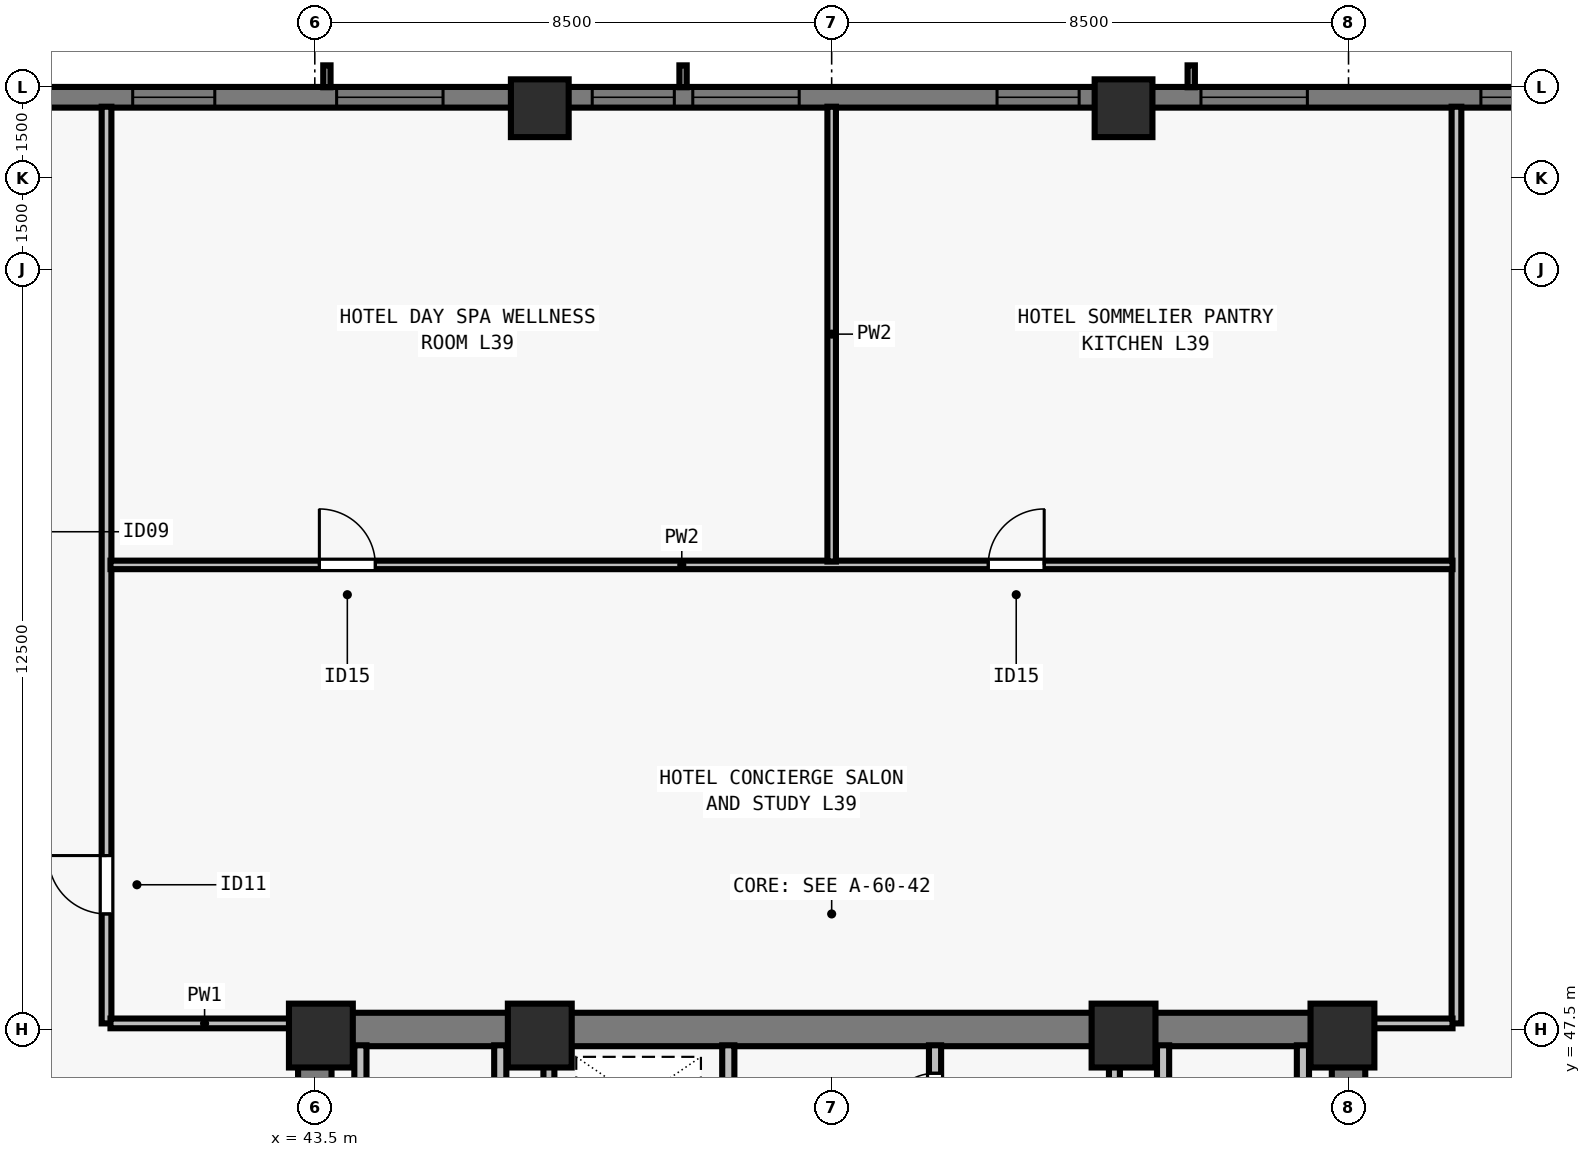
"""IFC4 building model, lengths in metres.
Left out: names, types, materials, properties, quantities, classifications, styles, units other than length and angle.
Written with IfcOpenShell. Run it as: python <this file> out.ifc"""

import sys

from ifc_helpers import new_model, si_unit, direction, frame, frame_2d, origin, origin_2d, place, context, subcontext, project, spatial, rectangle, extrude, element, fill, save


model = new_model("IFC4")
c1 = context("Model", 3, precision=1e-05, world=origin(), true_north=direction((0.0, 1.0)))
c2 = subcontext(c1, "Body", "Model", "MODEL_VIEW")
j1 = project(units=[si_unit("LENGTHUNIT", "METRE"), si_unit("PLANEANGLEUNIT", "RADIAN")], contexts=[c1])
p1 = place(None, origin())
s1 = spatial("IfcSite", under=j1, at=p1, CompositionType="ELEMENT")
p2 = place(p1, origin())
s2 = spatial("IfcBuilding", under=s1, at=p2, CompositionType="ELEMENT")
p3 = place(p2, frame((0.0, 0.0, 144.5)))
s3 = spatial("IfcBuildingStorey", under=s2, at=p3, CompositionType="ELEMENT", Elevation=144.5)
for number, where, z_axis, x_axis in (
    (1, (43.6, 47.4, 0.0), (0.0, 0.0, 1.0), (1.0, 0.0, 0.0)),
    (2, (47.2, 47.4, 0.0), (0.0, 0.0, 1.0), (1.0, 0.0, 0.0)),
    (3, (56.8, 47.4, 0.0), (0.0, 0.0, 1.0), (1.0, 0.0, 0.0)),
    (4, (60.4, 47.4, 0.0), (0.0, 0.0, 1.0), (1.0, 0.0, 0.0)),
):
    element("IfcColumn", number, at=place(p3, frame(where, z_axis=z_axis, x_axis=x_axis)), inside=s3, PredefinedType="COLUMN", context=c2, shape_type="SweptSolid", body=[
        extrude(rectangle(XDim=1.05, YDim=1.05, at=origin_2d()), origin(), (0.0, 0.0, 1.0), 3.5),
    ])
for number, where, z_axis, x_axis in (
    (5, (56.8, 62.65, 0.0), (0.0, 0.0, 1.0), (1.0, 0.0, 0.0)),
    (6, (47.2, 62.65, 0.0), (0.0, 0.0, 1.0), (1.0, 0.0, 0.0)),
):
    element("IfcColumn", number, at=place(p3, frame(where, z_axis=z_axis, x_axis=x_axis)), inside=s3, PredefinedType="COLUMN", context=c2, shape_type="SweptSolid", body=[
        extrude(rectangle(XDim=0.95, YDim=0.95, at=origin_2d()), origin(), (0.0, 0.0, 1.0), 3.5),
    ])
p4 = place(p3, frame((32.0, 62.83, 0.0), z_axis=(0.0, 0.0, 1.0), x_axis=(1.0, 0.0, 0.0)))
e7 = element("IfcWall", 7, at=p4, inside=s3, PredefinedType="SOLIDWALL", context=c2, shape_type="SweptSolid", body=[
    extrude(rectangle(XDim=39.682, YDim=0.34, at=frame_2d((19.841, 0.0))), origin(), (0.0, 0.0, 1.0), 3.28),
])
p5 = place(p4, frame((3.902, 0.0, 0.8)))
e8 = element("IfcOpeningElement", 8, at=p5, cuts=e7, PredefinedType="OPENING", context=c2, shape_type="SweptSolid", body=[
    extrude(rectangle(XDim=1.75, YDim=1.66, at=frame_2d((0.875, 0.83))), frame((0.0, 0.18, 0.0), z_axis=(0.0, -1.0, 0.0), x_axis=(1.0, 0.0, 0.0)), (0.0, 0.0, 1.0), 0.36),
])
p6 = place(p4, frame((8.505, 0.0, 0.8)))
e9 = element("IfcOpeningElement", 9, at=p6, cuts=e7, PredefinedType="OPENING", context=c2, shape_type="SweptSolid", body=[
    extrude(rectangle(XDim=1.35, YDim=1.66, at=frame_2d((0.675, 0.83))), frame((0.0, 0.18, 0.0), z_axis=(0.0, -1.0, 0.0), x_axis=(1.0, 0.0, 0.0)), (0.0, 0.0, 1.0), 0.36),
])
p7 = place(p4, frame((11.859, 0.0, 0.8)))
e10 = element("IfcOpeningElement", 10, at=p7, cuts=e7, PredefinedType="OPENING", context=c2, shape_type="SweptSolid", body=[
    extrude(rectangle(XDim=1.75, YDim=1.66, at=frame_2d((0.875, 0.83))), frame((0.0, 0.18, 0.0), z_axis=(0.0, -1.0, 0.0), x_axis=(1.0, 0.0, 0.0)), (0.0, 0.0, 1.0), 0.36),
])
p8 = place(p4, frame((16.062, 0.0, 0.8)))
e11 = element("IfcOpeningElement", 11, at=p8, cuts=e7, PredefinedType="OPENING", context=c2, shape_type="SweptSolid", body=[
    extrude(rectangle(XDim=1.35, YDim=1.66, at=frame_2d((0.675, 0.83))), frame((0.0, 0.18, 0.0), z_axis=(0.0, -1.0, 0.0), x_axis=(1.0, 0.0, 0.0)), (0.0, 0.0, 1.0), 0.36),
])
p9 = place(p4, frame((17.716, 0.0, 0.8)))
e12 = element("IfcOpeningElement", 12, at=p9, cuts=e7, PredefinedType="OPENING", context=c2, shape_type="SweptSolid", body=[
    extrude(rectangle(XDim=1.75, YDim=1.66, at=frame_2d((0.875, 0.83))), frame((0.0, 0.18, 0.0), z_axis=(0.0, -1.0, 0.0), x_axis=(1.0, 0.0, 0.0)), (0.0, 0.0, 1.0), 0.36),
])
p10 = place(p4, frame((22.719, 0.0, 0.8)))
e13 = element("IfcOpeningElement", 13, at=p10, cuts=e7, PredefinedType="OPENING", context=c2, shape_type="SweptSolid", body=[
    extrude(rectangle(XDim=1.35, YDim=1.66, at=frame_2d((0.675, 0.83))), frame((0.0, 0.18, 0.0), z_axis=(0.0, -1.0, 0.0), x_axis=(1.0, 0.0, 0.0)), (0.0, 0.0, 1.0), 0.36),
])
p11 = place(p4, frame((26.073, 0.0, 0.8)))
e14 = element("IfcOpeningElement", 14, at=p11, cuts=e7, PredefinedType="OPENING", context=c2, shape_type="SweptSolid", body=[
    extrude(rectangle(XDim=1.75, YDim=1.66, at=frame_2d((0.875, 0.83))), frame((0.0, 0.18, 0.0), z_axis=(0.0, -1.0, 0.0), x_axis=(1.0, 0.0, 0.0)), (0.0, 0.0, 1.0), 0.36),
])
p12 = place(p4, frame((30.677, 0.0, 0.8)))
e15 = element("IfcOpeningElement", 15, at=p12, cuts=e7, PredefinedType="OPENING", context=c2, shape_type="SweptSolid", body=[
    extrude(rectangle(XDim=1.35, YDim=1.66, at=frame_2d((0.675, 0.83))), frame((0.0, 0.18, 0.0), z_axis=(0.0, -1.0, 0.0), x_axis=(1.0, 0.0, 0.0)), (0.0, 0.0, 1.0), 0.36),
])
p13 = place(p4, frame((33.18, 0.0, 0.8)))
e16 = element("IfcOpeningElement", 16, at=p13, cuts=e7, PredefinedType="OPENING", context=c2, shape_type="SweptSolid", body=[
    extrude(rectangle(XDim=1.75, YDim=1.66, at=frame_2d((0.875, 0.83))), frame((0.0, 0.18, 0.0), z_axis=(0.0, -1.0, 0.0), x_axis=(1.0, 0.0, 0.0)), (0.0, 0.0, 1.0), 0.36),
])
p14 = place(p3, frame((43.225, 47.5, 0.0), z_axis=(0.0, 0.0, 1.0), x_axis=(1.0, 0.0, 0.0)))
e17 = element("IfcWall", 17, at=p14, inside=s3, PredefinedType="SHEAR", context=c2, shape_type="SweptSolid", body=[
    extrude(rectangle(XDim=17.55, YDim=0.55, at=frame_2d((8.775, 0.0))), origin(), (0.0, 0.0, 1.0), 3.28),
])
for number, where, z_axis, x_axis in (
    (18, (43.5, 40.8, 0.0), (0.0, 0.0, 1.0), (0.0, 1.0, 0.0)),
    (19, (60.5, 40.8, 0.0), (0.0, 0.0, 1.0), (0.0, 1.0, 0.0)),
):
    element("IfcWall", number, at=place(p3, frame(where, z_axis=z_axis, x_axis=x_axis)), inside=s3, PredefinedType="SHEAR", context=c2, shape_type="SweptSolid", body=[
        extrude(rectangle(XDim=6.435, YDim=0.55, at=frame_2d((3.218, 0.0))), origin(), (0.0, 0.0, 1.0), 3.28),
    ])
p15 = place(p3, frame((50.3, 40.585, 0.0), z_axis=(0.0, 0.0, 1.0), x_axis=(0.0, 1.0, 0.0)))
e20 = element("IfcWall", 20, at=p15, inside=s3, PredefinedType="SOLIDWALL", context=c2, shape_type="SweptSolid", body=[
    extrude(rectangle(XDim=6.655, YDim=0.2, at=frame_2d((3.328, 0.0))), origin(), (0.0, 0.0, 1.0), 3.28),
])
p16 = place(p15, frame((5.065, 0.0, 0.0)))
e21 = element("IfcOpeningElement", 21, at=p16, cuts=e20, PredefinedType="OPENING", context=c2, shape_type="SweptSolid", body=[
    extrude(rectangle(XDim=0.8, YDim=2.08, at=frame_2d((0.4, 1.04))), frame((0.0, 0.11, 0.0), z_axis=(0.0, -1.0, 0.0), x_axis=(1.0, 0.0, 0.0)), (0.0, 0.0, 1.0), 0.22),
])
p17 = place(p3, frame((53.7, 40.585, 0.0), z_axis=(0.0, 0.0, 1.0), x_axis=(0.0, 1.0, 0.0)))
e22 = element("IfcWall", 22, at=p17, inside=s3, PredefinedType="SOLIDWALL", context=c2, shape_type="SweptSolid", body=[
    extrude(rectangle(XDim=6.655, YDim=0.2, at=frame_2d((3.328, 0.0))), origin(), (0.0, 0.0, 1.0), 3.28),
])
p18 = place(p17, frame((0.195, 0.0, 0.0)))
e23 = element("IfcOpeningElement", 23, at=p18, cuts=e22, PredefinedType="OPENING", context=c2, shape_type="SweptSolid", body=[
    extrude(rectangle(XDim=0.8, YDim=2.08, at=frame_2d((0.4, 1.04))), frame((0.0, 0.11, 0.0), z_axis=(0.0, -1.0, 0.0), x_axis=(1.0, 0.0, 0.0)), (0.0, 0.0, 1.0), 0.22),
])
p19 = place(p17, frame((3.735, 0.0, 0.0)))
e24 = element("IfcOpeningElement", 24, at=p19, cuts=e22, PredefinedType="OPENING", context=c2, shape_type="SweptSolid", body=[
    extrude(rectangle(XDim=0.9, YDim=2.12, at=frame_2d((0.45, 1.06))), frame((0.0, 0.11, 0.0), z_axis=(0.0, -1.0, 0.0), x_axis=(1.0, 0.0, 0.0)), (0.0, 0.0, 1.0), 0.22),
])
p20 = place(p17, frame((5.395, 0.0, 0.0)))
e25 = element("IfcOpeningElement", 25, at=p20, cuts=e22, PredefinedType="OPENING", context=c2, shape_type="SweptSolid", body=[
    extrude(rectangle(XDim=0.8, YDim=2.1, at=frame_2d((0.4, 1.05))), frame((0.0, 0.11, 0.0), z_axis=(0.0, -1.0, 0.0), x_axis=(1.0, 0.0, 0.0)), (0.0, 0.0, 1.0), 0.22),
])
for number, where, z_axis, x_axis in (
    (26, (46.55, 43.735, 0.0), (0.0, 0.0, 1.0), (0.0, 1.0, 0.0)),
    (27, (44.25, 43.735, 0.0), (0.0, 0.0, 1.0), (0.0, 1.0, 0.0)),
    (28, (57.45, 43.735, 0.0), (0.0, 0.0, 1.0), (0.0, 1.0, 0.0)),
    (29, (59.75, 43.735, 0.0), (0.0, 0.0, 1.0), (0.0, 1.0, 0.0)),
):
    element("IfcWall", number, at=place(p3, frame(where, z_axis=z_axis, x_axis=x_axis)), inside=s3, PredefinedType="SOLIDWALL", context=c2, shape_type="SweptSolid", body=[
        extrude(rectangle(XDim=3.505, YDim=0.2, at=frame_2d((1.752, 0.0))), origin(), (0.0, 0.0, 1.0), 3.28),
    ])
for number, where, z_axis, x_axis in (
    (30, (47.35, 43.735, 0.0), (0.0, 0.0, 1.0), (0.0, 1.0, 0.0)),
    (31, (56.65, 43.735, 0.0), (0.0, 0.0, 1.0), (0.0, 1.0, 0.0)),
):
    element("IfcWall", number, at=place(p3, frame(where, z_axis=z_axis, x_axis=x_axis)), inside=s3, PredefinedType="SOLIDWALL", context=c2, shape_type="SweptSolid", body=[
        extrude(rectangle(XDim=3.505, YDim=0.18, at=frame_2d((1.752, 0.0))), origin(), (0.0, 0.0, 1.0), 3.28),
    ])
p21 = place(p3, frame((40.075, 47.6, 0.0), z_axis=(0.0, 0.0, 1.0), x_axis=(0.0, 1.0, 0.0)))
e32 = element("IfcWall", 32, at=p21, inside=s3, PredefinedType="PARTITIONING", context=c2, shape_type="SweptSolid", body=[
    extrude(rectangle(XDim=15.075, YDim=0.16, at=frame_2d((7.538, 0.0))), origin(), (0.0, 0.0, 1.0), 2.555),
])
p22 = place(p21, frame((1.8, 0.0, 0.0)))
e33 = element("IfcOpeningElement", 33, at=p22, cuts=e32, PredefinedType="OPENING", context=c2, shape_type="SweptSolid", body=[
    extrude(rectangle(XDim=0.96, YDim=2.12, at=frame_2d((0.48, 1.06))), frame((0.0, 0.09, 0.0), z_axis=(0.0, -1.0, 0.0), x_axis=(1.0, 0.0, 0.0)), (0.0, 0.0, 1.0), 0.18),
])
p23 = place(p3, frame((40.14, 47.6, 0.0), z_axis=(0.0, 0.0, 1.0), x_axis=(1.0, 0.0, 0.0)))
e34 = element("IfcWall", 34, at=p23, inside=s3, PredefinedType="PARTITIONING", context=c2, shape_type="SweptSolid", body=[
    extrude(rectangle(XDim=3.095, YDim=0.16, at=frame_2d((1.548, 0.0))), origin(), (0.0, 0.0, 1.0), 3.28),
])
p24 = place(p3, frame((62.275, 47.6, 0.0), z_axis=(0.0, 0.0, 1.0), x_axis=(0.0, 1.0, 0.0)))
e35 = element("IfcWall", 35, at=p24, inside=s3, PredefinedType="PARTITIONING", context=c2, shape_type="SweptSolid", body=[
    extrude(rectangle(XDim=15.075, YDim=0.16, at=frame_2d((7.538, 0.0))), origin(), (0.0, 0.0, 1.0), 2.555),
])
p25 = place(p3, frame((60.765, 47.6, 0.0), z_axis=(0.0, 0.0, 1.0), x_axis=(1.0, 0.0, 0.0)))
e36 = element("IfcWall", 36, at=p25, inside=s3, PredefinedType="PARTITIONING", context=c2, shape_type="SweptSolid", body=[
    extrude(rectangle(XDim=1.445, YDim=0.16, at=frame_2d((0.723, 0.0))), origin(), (0.0, 0.0, 1.0), 3.28),
])
p26 = place(p3, frame((40.14, 55.14, 0.0), z_axis=(0.0, 0.0, 1.0), x_axis=(1.0, 0.0, 0.0)))
e37 = element("IfcWall", 37, at=p26, inside=s3, PredefinedType="PARTITIONING", context=c2, shape_type="SweptSolid", body=[
    extrude(rectangle(XDim=22.07, YDim=0.14, at=frame_2d((11.035, 0.0))), origin(), (0.0, 0.0, 1.0), 3.28),
])
p27 = place(p26, frame((3.435, 0.0, 0.0)))
e38 = element("IfcOpeningElement", 38, at=p27, cuts=e37, PredefinedType="OPENING", context=c2, shape_type="SweptSolid", body=[
    extrude(rectangle(XDim=0.92, YDim=2.12, at=frame_2d((0.46, 1.06))), frame((0.0, 0.08, 0.0), z_axis=(0.0, -1.0, 0.0), x_axis=(1.0, 0.0, 0.0)), (0.0, 0.0, 1.0), 0.16),
])
p28 = place(p26, frame((14.435, 0.0, 0.0)))
e39 = element("IfcOpeningElement", 39, at=p28, cuts=e37, PredefinedType="OPENING", context=c2, shape_type="SweptSolid", body=[
    extrude(rectangle(XDim=0.92, YDim=2.12, at=frame_2d((0.46, 1.06))), frame((0.0, 0.08, 0.0), z_axis=(0.0, -1.0, 0.0), x_axis=(1.0, 0.0, 0.0)), (0.0, 0.0, 1.0), 0.16),
])
p29 = place(p3, frame((52.0, 55.195, 0.0), z_axis=(0.0, 0.0, 1.0), x_axis=(0.0, 1.0, 0.0)))
e40 = element("IfcWall", 40, at=p29, inside=s3, PredefinedType="PARTITIONING", context=c2, shape_type="SweptSolid", body=[
    extrude(rectangle(XDim=7.48, YDim=0.14, at=frame_2d((3.74, 0.0))), origin(), (0.0, 0.0, 1.0), 3.28),
])
p30 = place(p6, origin())
e41 = element("IfcWindow", 41, at=p30, inside=s3, PartitioningType="SINGLE_PANEL", PredefinedType="WINDOW", context=c2, shape_type="SweptSolid", body=[
    extrude(rectangle(XDim=1.35, YDim=1.66, at=frame_2d((0.675, 0.83))), frame((0.0, -0.05, 0.0), z_axis=(0.0, -1.0, 0.0), x_axis=(1.0, 0.0, 0.0)), (0.0, 0.0, 1.0), 0.06),
])
fill(e9, e41)
p31 = place(p7, origin())
e42 = element("IfcWindow", 42, at=p31, inside=s3, PartitioningType="SINGLE_PANEL", PredefinedType="WINDOW", context=c2, shape_type="SweptSolid", body=[
    extrude(rectangle(XDim=1.75, YDim=1.66, at=frame_2d((0.875, 0.83))), frame((0.0, -0.05, 0.0), z_axis=(0.0, -1.0, 0.0), x_axis=(1.0, 0.0, 0.0)), (0.0, 0.0, 1.0), 0.06),
])
fill(e10, e42)
p32 = place(p8, origin())
e43 = element("IfcWindow", 43, at=p32, inside=s3, PartitioningType="SINGLE_PANEL", PredefinedType="WINDOW", context=c2, shape_type="SweptSolid", body=[
    extrude(rectangle(XDim=1.35, YDim=1.66, at=frame_2d((0.675, 0.83))), frame((0.0, -0.05, 0.0), z_axis=(0.0, -1.0, 0.0), x_axis=(1.0, 0.0, 0.0)), (0.0, 0.0, 1.0), 0.06),
])
fill(e11, e43)
p33 = place(p9, origin())
e44 = element("IfcWindow", 44, at=p33, inside=s3, PartitioningType="SINGLE_PANEL", PredefinedType="WINDOW", context=c2, shape_type="SweptSolid", body=[
    extrude(rectangle(XDim=1.75, YDim=1.66, at=frame_2d((0.875, 0.83))), frame((0.0, -0.05, 0.0), z_axis=(0.0, -1.0, 0.0), x_axis=(1.0, 0.0, 0.0)), (0.0, 0.0, 1.0), 0.06),
])
fill(e12, e44)
p34 = place(p10, origin())
e45 = element("IfcWindow", 45, at=p34, inside=s3, PartitioningType="SINGLE_PANEL", PredefinedType="WINDOW", context=c2, shape_type="SweptSolid", body=[
    extrude(rectangle(XDim=1.35, YDim=1.66, at=frame_2d((0.675, 0.83))), frame((0.0, -0.05, 0.0), z_axis=(0.0, -1.0, 0.0), x_axis=(1.0, 0.0, 0.0)), (0.0, 0.0, 1.0), 0.06),
])
fill(e13, e45)
p35 = place(p11, origin())
e46 = element("IfcWindow", 46, at=p35, inside=s3, PartitioningType="SINGLE_PANEL", PredefinedType="WINDOW", context=c2, shape_type="SweptSolid", body=[
    extrude(rectangle(XDim=1.75, YDim=1.66, at=frame_2d((0.875, 0.83))), frame((0.0, -0.05, 0.0), z_axis=(0.0, -1.0, 0.0), x_axis=(1.0, 0.0, 0.0)), (0.0, 0.0, 1.0), 0.06),
])
fill(e14, e46)
p36 = place(p12, origin())
e47 = element("IfcWindow", 47, at=p36, inside=s3, PartitioningType="SINGLE_PANEL", PredefinedType="WINDOW", context=c2, shape_type="SweptSolid", body=[
    extrude(rectangle(XDim=1.35, YDim=1.66, at=frame_2d((0.675, 0.83))), frame((0.0, -0.05, 0.0), z_axis=(0.0, -1.0, 0.0), x_axis=(1.0, 0.0, 0.0)), (0.0, 0.0, 1.0), 0.06),
])
fill(e15, e47)
p37 = place(p20, origin())
e48 = element("IfcDoor", 48, at=p37, inside=s3, OperationType="SINGLE_SWING_LEFT", PredefinedType="DOOR", context=c2, shape_type="SweptSolid", body=[
    extrude(rectangle(XDim=0.8, YDim=2.1, at=frame_2d((0.4, 1.05))), frame((0.0, 0.025, 0.0), z_axis=(0.0, -1.0, 0.0), x_axis=(1.0, 0.0, 0.0)), (0.0, 0.0, 1.0), 0.05),
])
fill(e25, e48)
p38 = place(p22, origin())
e49 = element("IfcDoor", 49, at=p38, inside=s3, OperationType="SINGLE_SWING_RIGHT", PredefinedType="DOOR", context=c2, shape_type="SweptSolid", body=[
    extrude(rectangle(XDim=0.96, YDim=2.12, at=frame_2d((0.48, 1.06))), frame((0.0, 0.025, 0.0), z_axis=(0.0, -1.0, 0.0), x_axis=(1.0, 0.0, 0.0)), (0.0, 0.0, 1.0), 0.05),
])
fill(e33, e49)
p39 = place(p27, origin())
e50 = element("IfcDoor", 50, at=p39, inside=s3, OperationType="SINGLE_SWING_LEFT", PredefinedType="DOOR", context=c2, shape_type="SweptSolid", body=[
    extrude(rectangle(XDim=0.92, YDim=2.12, at=frame_2d((0.46, 1.06))), frame((0.0, 0.025, 0.0), z_axis=(0.0, -1.0, 0.0), x_axis=(1.0, 0.0, 0.0)), (0.0, 0.0, 1.0), 0.05),
])
fill(e38, e50)
p40 = place(p28, origin())
e51 = element("IfcDoor", 51, at=p40, inside=s3, OperationType="SINGLE_SWING_RIGHT", PredefinedType="DOOR", context=c2, shape_type="SweptSolid", body=[
    extrude(rectangle(XDim=0.92, YDim=2.12, at=frame_2d((0.46, 1.06))), frame((0.0, 0.025, 0.0), z_axis=(0.0, -1.0, 0.0), x_axis=(1.0, 0.0, 0.0)), (0.0, 0.0, 1.0), 0.05),
])
fill(e39, e51)
save(model, sys.argv[1])
